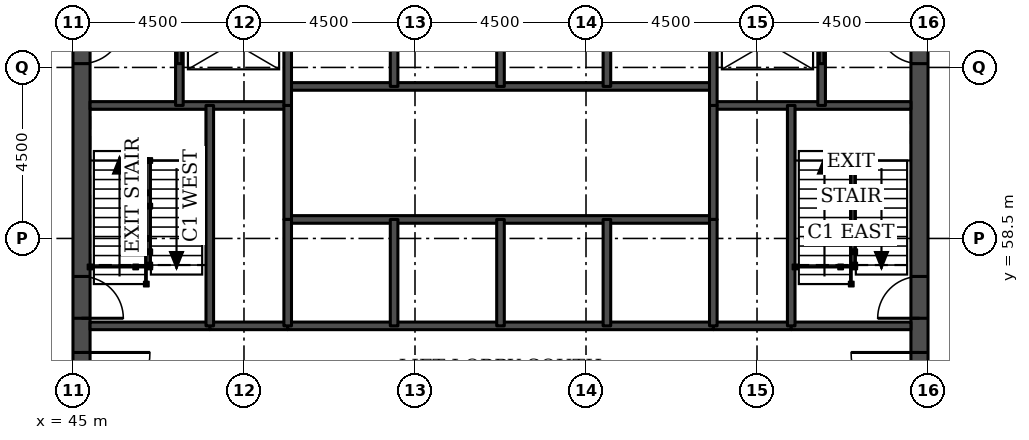
"""IFC4 building model, lengths in metres.
Left out: names, types, materials, properties, quantities, classifications, styles, units other than length and angle.
Written with IfcOpenShell. Run it as: python <this file> out.ifc"""

import sys

from ifc_helpers import new_model, si_unit, direction, frame, frame_2d, origin, place, context, subcontext, project, spatial, rectangle, extrude, element, fill, save


model = new_model("IFC4")
c1 = context("Model", 3, precision=1e-05, world=origin(), true_north=direction((0.0, 1.0)))
c2 = subcontext(c1, "Body", "Model", "MODEL_VIEW")
j1 = project(units=[si_unit("LENGTHUNIT", "METRE"), si_unit("PLANEANGLEUNIT", "RADIAN")], contexts=[c1])
p1 = place(None, origin())
s1 = spatial("IfcSite", under=j1, at=p1, CompositionType="ELEMENT")
p2 = place(p1, origin())
s2 = spatial("IfcBuilding", under=s1, at=p2, CompositionType="ELEMENT")
p3 = place(p2, frame((0.0, 0.0, 115.9)))
s3 = spatial("IfcBuildingStorey", under=s2, at=p3, CompositionType="ELEMENT", Elevation=115.9)
p4 = place(p3, frame((45.225, 49.5, 0.0), z_axis=(0.0, 0.0, 1.0), x_axis=(0.0, 1.0, 0.0)))
e1 = element("IfcWall", 1, at=p4, inside=s3, PredefinedType="SHEAR", context=c2, shape_type="SweptSolid", body=[
    extrude(rectangle(XDim=22.5, YDim=0.45, at=frame_2d((11.25, 0.0))), origin(), (0.0, 0.0, 1.0), 3.7),
])
p5 = place(p4, frame((4.2, 0.0, 0.0)))
e2 = element("IfcOpeningElement", 2, at=p5, cuts=e1, PredefinedType="OPENING", context=c2, shape_type="SweptSolid", body=[
    extrude(rectangle(XDim=1.8, YDim=2.1, at=frame_2d((0.9, 1.05))), frame((0.0, 0.235, 0.0), z_axis=(0.0, -1.0, 0.0), x_axis=(1.0, 0.0, 0.0)), (0.0, 0.0, 1.0), 0.47),
])
p6 = place(p4, frame((6.9, 0.0, 0.0)))
e3 = element("IfcOpeningElement", 3, at=p6, cuts=e1, PredefinedType="OPENING", context=c2, shape_type="SweptSolid", body=[
    extrude(rectangle(XDim=1.1, YDim=2.1, at=frame_2d((0.55, 1.05))), frame((0.0, 0.235, 0.0), z_axis=(0.0, -1.0, 0.0), x_axis=(1.0, 0.0, 0.0)), (0.0, 0.0, 1.0), 0.47),
])
p7 = place(p4, frame((13.6, 0.0, 0.0)))
e4 = element("IfcOpeningElement", 4, at=p7, cuts=e1, PredefinedType="OPENING", context=c2, shape_type="SweptSolid", body=[
    extrude(rectangle(XDim=1.1, YDim=2.1, at=frame_2d((0.55, 1.05))), frame((0.0, 0.235, 0.0), z_axis=(0.0, -1.0, 0.0), x_axis=(1.0, 0.0, 0.0)), (0.0, 0.0, 1.0), 0.47),
])
p8 = place(p4, frame((16.5, 0.0, 0.0)))
e5 = element("IfcOpeningElement", 5, at=p8, cuts=e1, PredefinedType="OPENING", context=c2, shape_type="SweptSolid", body=[
    extrude(rectangle(XDim=1.8, YDim=2.1, at=frame_2d((0.9, 1.05))), frame((0.0, 0.235, 0.0), z_axis=(0.0, -1.0, 0.0), x_axis=(1.0, 0.0, 0.0)), (0.0, 0.0, 1.0), 0.47),
])
p9 = place(p3, frame((67.275, 49.5, 0.0), z_axis=(0.0, 0.0, 1.0), x_axis=(0.0, 1.0, 0.0)))
e6 = element("IfcWall", 6, at=p9, inside=s3, PredefinedType="SHEAR", context=c2, shape_type="SweptSolid", body=[
    extrude(rectangle(XDim=22.5, YDim=0.45, at=frame_2d((11.25, 0.0))), origin(), (0.0, 0.0, 1.0), 3.7),
])
p10 = place(p9, frame((4.2, 0.0, 0.0)))
e7 = element("IfcOpeningElement", 7, at=p10, cuts=e6, PredefinedType="OPENING", context=c2, shape_type="SweptSolid", body=[
    extrude(rectangle(XDim=1.8, YDim=2.1, at=frame_2d((0.9, 1.05))), frame((0.0, 0.235, 0.0), z_axis=(0.0, -1.0, 0.0), x_axis=(1.0, 0.0, 0.0)), (0.0, 0.0, 1.0), 0.47),
])
p11 = place(p9, frame((6.9, 0.0, 0.0)))
e8 = element("IfcOpeningElement", 8, at=p11, cuts=e6, PredefinedType="OPENING", context=c2, shape_type="SweptSolid", body=[
    extrude(rectangle(XDim=1.1, YDim=2.1, at=frame_2d((0.55, 1.05))), frame((0.0, 0.235, 0.0), z_axis=(0.0, -1.0, 0.0), x_axis=(1.0, 0.0, 0.0)), (0.0, 0.0, 1.0), 0.47),
])
p12 = place(p9, frame((13.6, 0.0, 0.0)))
e9 = element("IfcOpeningElement", 9, at=p12, cuts=e6, PredefinedType="OPENING", context=c2, shape_type="SweptSolid", body=[
    extrude(rectangle(XDim=1.1, YDim=2.1, at=frame_2d((0.55, 1.05))), frame((0.0, 0.235, 0.0), z_axis=(0.0, -1.0, 0.0), x_axis=(1.0, 0.0, 0.0)), (0.0, 0.0, 1.0), 0.47),
])
p13 = place(p9, frame((16.5, 0.0, 0.0)))
e10 = element("IfcOpeningElement", 10, at=p13, cuts=e6, PredefinedType="OPENING", context=c2, shape_type="SweptSolid", body=[
    extrude(rectangle(XDim=1.8, YDim=2.1, at=frame_2d((0.9, 1.05))), frame((0.0, 0.235, 0.0), z_axis=(0.0, -1.0, 0.0), x_axis=(1.0, 0.0, 0.0)), (0.0, 0.0, 1.0), 0.47),
])
for number, where, z_axis, x_axis in (
    (11, (48.6, 56.2, 0.0), (0.0, 0.0, 1.0), (1.0, 0.0, 0.0)),
    (12, (61.85, 56.2, 0.0), (0.0, 0.0, 1.0), (1.0, 0.0, 0.0)),
):
    element("IfcWall", number, at=place(p3, frame(where, z_axis=z_axis, x_axis=x_axis)), inside=s3, PredefinedType="SOLIDWALL", context=c2, shape_type="SweptSolid", body=[
        extrude(rectangle(XDim=2.05, YDim=0.2, at=frame_2d((1.025, 0.0))), origin(), (0.0, 0.0, 1.0), 3.55),
    ])
p14 = place(p3, frame((45.45, 56.2, 0.0), z_axis=(0.0, 0.0, 1.0), x_axis=(1.0, 0.0, 0.0)))
e13 = element("IfcWall", 13, at=p14, inside=s3, PredefinedType="SOLIDWALL", context=c2, shape_type="SweptSolid", body=[
    extrude(rectangle(XDim=3.15, YDim=0.2, at=frame_2d((1.575, 0.0))), origin(), (0.0, 0.0, 1.0), 3.55),
])
p15 = place(p3, frame((50.65, 56.2, 0.0), z_axis=(0.0, 0.0, 1.0), x_axis=(1.0, 0.0, 0.0)))
e14 = element("IfcWall", 14, at=p15, inside=s3, PredefinedType="SOLIDWALL", context=c2, shape_type="SweptSolid", body=[
    extrude(rectangle(XDim=11.2, YDim=0.2, at=frame_2d((5.6, 0.0))), origin(), (0.0, 0.0, 1.0), 3.55),
])
p16 = place(p3, frame((63.9, 56.2, 0.0), z_axis=(0.0, 0.0, 1.0), x_axis=(1.0, 0.0, 0.0)))
e15 = element("IfcWall", 15, at=p16, inside=s3, PredefinedType="SOLIDWALL", context=c2, shape_type="SweptSolid", body=[
    extrude(rectangle(XDim=3.15, YDim=0.2, at=frame_2d((1.575, 0.0))), origin(), (0.0, 0.0, 1.0), 3.55),
])
p17 = place(p3, frame((50.65, 59.0, 0.0), z_axis=(0.0, 0.0, 1.0), x_axis=(1.0, 0.0, 0.0)))
e16 = element("IfcWall", 16, at=p17, inside=s3, PredefinedType="SOLIDWALL", context=c2, shape_type="SweptSolid", body=[
    extrude(rectangle(XDim=11.2, YDim=0.2, at=frame_2d((5.6, 0.0))), origin(), (0.0, 0.0, 1.0), 3.7),
])
for number, where, z_axis, x_axis in (
    (17, (45.45, 62.0, 0.0), (0.0, 0.0, 1.0), (1.0, 0.0, 0.0)),
    (18, (61.85, 62.0, 0.0), (0.0, 0.0, 1.0), (1.0, 0.0, 0.0)),
):
    element("IfcWall", number, at=place(p3, frame(where, z_axis=z_axis, x_axis=x_axis)), inside=s3, PredefinedType="SOLIDWALL", context=c2, shape_type="SweptSolid", body=[
        extrude(rectangle(XDim=5.2, YDim=0.2, at=frame_2d((2.6, 0.0))), origin(), (0.0, 0.0, 1.0), 3.55),
    ])
p18 = place(p3, frame((50.65, 62.5, 0.0), z_axis=(0.0, 0.0, 1.0), x_axis=(1.0, 0.0, 0.0)))
e19 = element("IfcWall", 19, at=p18, inside=s3, PredefinedType="SOLIDWALL", context=c2, shape_type="SweptSolid", body=[
    extrude(rectangle(XDim=11.2, YDim=0.2, at=frame_2d((5.6, 0.0))), origin(), (0.0, 0.0, 1.0), 3.7),
])
p19 = place(p3, frame((47.8, 62.0, 0.0), z_axis=(0.0, 0.0, 1.0), x_axis=(0.0, 1.0, 0.0)))
e20 = element("IfcWall", 20, at=p19, inside=s3, PredefinedType="SOLIDWALL", context=c2, shape_type="SweptSolid", body=[
    extrude(rectangle(XDim=3.3, YDim=0.2, at=frame_2d((1.65, 0.0))), origin(), (0.0, 0.0, 1.0), 3.55),
])
p20 = place(p19, frame((1.1, 0.0, 0.0)))
e21 = element("IfcOpeningElement", 21, at=p20, cuts=e20, PredefinedType="OPENING", context=c2, shape_type="SweptSolid", body=[
    extrude(rectangle(XDim=1.1, YDim=2.1, at=frame_2d((0.55, 1.05))), frame((0.0, 0.11, 0.0), z_axis=(0.0, -1.0, 0.0), x_axis=(1.0, 0.0, 0.0)), (0.0, 0.0, 1.0), 0.22),
])
p21 = place(p3, frame((48.6, 56.2, 0.0), z_axis=(0.0, 0.0, 1.0), x_axis=(0.0, 1.0, 0.0)))
e22 = element("IfcWall", 22, at=p21, inside=s3, PredefinedType="SOLIDWALL", context=c2, shape_type="SweptSolid", body=[
    extrude(rectangle(XDim=5.8, YDim=0.2, at=frame_2d((2.9, 0.0))), origin(), (0.0, 0.0, 1.0), 3.55),
])
p22 = place(p3, frame((50.65, 59.0, 0.0), z_axis=(0.0, 0.0, 1.0), x_axis=(0.0, 1.0, 0.0)))
e23 = element("IfcWall", 23, at=p22, inside=s3, PredefinedType="SOLIDWALL", context=c2, shape_type="SweptSolid", body=[
    extrude(rectangle(XDim=3.0, YDim=0.2, at=frame_2d((1.5, 0.0))), origin(), (0.0, 0.0, 1.0), 3.7),
])
p23 = place(p3, frame((50.65, 56.2, 0.0), z_axis=(0.0, 0.0, 1.0), x_axis=(0.0, 1.0, 0.0)))
e24 = element("IfcWall", 24, at=p23, inside=s3, PredefinedType="SOLIDWALL", context=c2, shape_type="SweptSolid", body=[
    extrude(rectangle(XDim=2.8, YDim=0.2, at=frame_2d((1.4, 0.0))), origin(), (0.0, 0.0, 1.0), 3.55),
])
p24 = place(p3, frame((50.65, 62.0, 0.0), z_axis=(0.0, 0.0, 1.0), x_axis=(0.0, 1.0, 0.0)))
e25 = element("IfcWall", 25, at=p24, inside=s3, PredefinedType="SOLIDWALL", context=c2, shape_type="SweptSolid", body=[
    extrude(rectangle(XDim=3.3, YDim=0.2, at=frame_2d((1.65, 0.0))), origin(), (0.0, 0.0, 1.0), 3.55),
])
for number, where, z_axis, x_axis in (
    (26, (53.45, 56.2, 0.0), (0.0, 0.0, 1.0), (0.0, 1.0, 0.0)),
    (27, (53.45, 62.5, 0.0), (0.0, 0.0, 1.0), (0.0, 1.0, 0.0)),
    (28, (56.25, 56.2, 0.0), (0.0, 0.0, 1.0), (0.0, 1.0, 0.0)),
    (29, (56.25, 62.5, 0.0), (0.0, 0.0, 1.0), (0.0, 1.0, 0.0)),
    (30, (59.05, 56.2, 0.0), (0.0, 0.0, 1.0), (0.0, 1.0, 0.0)),
    (31, (59.05, 62.5, 0.0), (0.0, 0.0, 1.0), (0.0, 1.0, 0.0)),
):
    element("IfcWall", number, at=place(p3, frame(where, z_axis=z_axis, x_axis=x_axis)), inside=s3, PredefinedType="SOLIDWALL", context=c2, shape_type="SweptSolid", body=[
        extrude(rectangle(XDim=2.8, YDim=0.2, at=frame_2d((1.4, 0.0))), origin(), (0.0, 0.0, 1.0), 3.55),
    ])
p25 = place(p3, frame((61.85, 59.0, 0.0), z_axis=(0.0, 0.0, 1.0), x_axis=(0.0, 1.0, 0.0)))
e32 = element("IfcWall", 32, at=p25, inside=s3, PredefinedType="SOLIDWALL", context=c2, shape_type="SweptSolid", body=[
    extrude(rectangle(XDim=3.0, YDim=0.2, at=frame_2d((1.5, 0.0))), origin(), (0.0, 0.0, 1.0), 3.7),
])
p26 = place(p3, frame((61.85, 56.2, 0.0), z_axis=(0.0, 0.0, 1.0), x_axis=(0.0, 1.0, 0.0)))
e33 = element("IfcWall", 33, at=p26, inside=s3, PredefinedType="SOLIDWALL", context=c2, shape_type="SweptSolid", body=[
    extrude(rectangle(XDim=2.8, YDim=0.2, at=frame_2d((1.4, 0.0))), origin(), (0.0, 0.0, 1.0), 3.55),
])
p27 = place(p3, frame((61.85, 62.0, 0.0), z_axis=(0.0, 0.0, 1.0), x_axis=(0.0, 1.0, 0.0)))
e34 = element("IfcWall", 34, at=p27, inside=s3, PredefinedType="SOLIDWALL", context=c2, shape_type="SweptSolid", body=[
    extrude(rectangle(XDim=3.3, YDim=0.2, at=frame_2d((1.65, 0.0))), origin(), (0.0, 0.0, 1.0), 3.55),
])
p28 = place(p3, frame((63.9, 56.2, 0.0), z_axis=(0.0, 0.0, 1.0), x_axis=(0.0, 1.0, 0.0)))
e35 = element("IfcWall", 35, at=p28, inside=s3, PredefinedType="SOLIDWALL", context=c2, shape_type="SweptSolid", body=[
    extrude(rectangle(XDim=5.8, YDim=0.2, at=frame_2d((2.9, 0.0))), origin(), (0.0, 0.0, 1.0), 3.55),
])
p29 = place(p3, frame((64.7, 62.0, 0.0), z_axis=(0.0, 0.0, 1.0), x_axis=(0.0, 1.0, 0.0)))
e36 = element("IfcWall", 36, at=p29, inside=s3, PredefinedType="SOLIDWALL", context=c2, shape_type="SweptSolid", body=[
    extrude(rectangle(XDim=3.3, YDim=0.2, at=frame_2d((1.65, 0.0))), origin(), (0.0, 0.0, 1.0), 3.55),
])
p30 = place(p29, frame((1.1, 0.0, 0.0)))
e37 = element("IfcOpeningElement", 37, at=p30, cuts=e36, PredefinedType="OPENING", context=c2, shape_type="SweptSolid", body=[
    extrude(rectangle(XDim=1.1, YDim=2.1, at=frame_2d((0.55, 1.05))), frame((0.0, 0.11, 0.0), z_axis=(0.0, -1.0, 0.0), x_axis=(1.0, 0.0, 0.0)), (0.0, 0.0, 1.0), 0.22),
])
p31 = place(p20, origin())
e38 = element("IfcDoor", 38, at=p31, inside=s3, OperationType="DOUBLE_DOOR_SLIDING", PredefinedType="DOOR", context=c2, shape_type="SweptSolid", body=[
    extrude(rectangle(XDim=1.1, YDim=2.1, at=frame_2d((0.55, 1.05))), frame((0.0, 0.025, 0.0), z_axis=(0.0, -1.0, 0.0), x_axis=(1.0, 0.0, 0.0)), (0.0, 0.0, 1.0), 0.05),
])
fill(e21, e38)
p32 = place(p30, origin())
e39 = element("IfcDoor", 39, at=p32, inside=s3, OperationType="DOUBLE_DOOR_SLIDING", PredefinedType="DOOR", context=c2, shape_type="SweptSolid", body=[
    extrude(rectangle(XDim=1.1, YDim=2.1, at=frame_2d((0.55, 1.05))), frame((0.0, 0.025, 0.0), z_axis=(0.0, -1.0, 0.0), x_axis=(1.0, 0.0, 0.0)), (0.0, 0.0, 1.0), 0.05),
])
fill(e37, e39)
p33 = place(p5, frame((1.8, 0.0, 0.0), z_axis=(0.0, 0.0, 1.0), x_axis=(-1.0, 0.0, 0.0)))
e40 = element("IfcDoor", 40, at=p33, inside=s3, OperationType="SINGLE_SWING_LEFT", PredefinedType="DOOR", context=c2, shape_type="SweptSolid", body=[
    extrude(rectangle(XDim=1.8, YDim=2.1, at=frame_2d((0.9, 1.05))), frame((0.0, 0.025, 0.0), z_axis=(0.0, -1.0, 0.0), x_axis=(1.0, 0.0, 0.0)), (0.0, 0.0, 1.0), 0.05),
])
fill(e2, e40)
p34 = place(p6, frame((1.1, 0.0, 0.0), z_axis=(0.0, 0.0, 1.0), x_axis=(-1.0, 0.0, 0.0)))
e41 = element("IfcDoor", 41, at=p34, inside=s3, OperationType="SINGLE_SWING_RIGHT", PredefinedType="DOOR", context=c2, shape_type="SweptSolid", body=[
    extrude(rectangle(XDim=1.1, YDim=2.1, at=frame_2d((0.55, 1.05))), frame((0.0, 0.025, 0.0), z_axis=(0.0, -1.0, 0.0), x_axis=(1.0, 0.0, 0.0)), (0.0, 0.0, 1.0), 0.05),
])
fill(e3, e41)
p35 = place(p7, frame((1.1, 0.0, 0.0), z_axis=(0.0, 0.0, 1.0), x_axis=(-1.0, 0.0, 0.0)))
e42 = element("IfcDoor", 42, at=p35, inside=s3, OperationType="SINGLE_SWING_LEFT", PredefinedType="DOOR", context=c2, shape_type="SweptSolid", body=[
    extrude(rectangle(XDim=1.1, YDim=2.1, at=frame_2d((0.55, 1.05))), frame((0.0, 0.025, 0.0), z_axis=(0.0, -1.0, 0.0), x_axis=(1.0, 0.0, 0.0)), (0.0, 0.0, 1.0), 0.05),
])
fill(e4, e42)
p36 = place(p10, origin())
e43 = element("IfcDoor", 43, at=p36, inside=s3, OperationType="SINGLE_SWING_RIGHT", PredefinedType="DOOR", context=c2, shape_type="SweptSolid", body=[
    extrude(rectangle(XDim=1.8, YDim=2.1, at=frame_2d((0.9, 1.05))), frame((0.0, 0.025, 0.0), z_axis=(0.0, -1.0, 0.0), x_axis=(1.0, 0.0, 0.0)), (0.0, 0.0, 1.0), 0.05),
])
fill(e7, e43)
p37 = place(p11, origin())
e44 = element("IfcDoor", 44, at=p37, inside=s3, OperationType="SINGLE_SWING_LEFT", PredefinedType="DOOR", context=c2, shape_type="SweptSolid", body=[
    extrude(rectangle(XDim=1.1, YDim=2.1, at=frame_2d((0.55, 1.05))), frame((0.0, 0.025, 0.0), z_axis=(0.0, -1.0, 0.0), x_axis=(1.0, 0.0, 0.0)), (0.0, 0.0, 1.0), 0.05),
])
fill(e8, e44)
p38 = place(p12, origin())
e45 = element("IfcDoor", 45, at=p38, inside=s3, OperationType="SINGLE_SWING_RIGHT", PredefinedType="DOOR", context=c2, shape_type="SweptSolid", body=[
    extrude(rectangle(XDim=1.1, YDim=2.1, at=frame_2d((0.55, 1.05))), frame((0.0, 0.025, 0.0), z_axis=(0.0, -1.0, 0.0), x_axis=(1.0, 0.0, 0.0)), (0.0, 0.0, 1.0), 0.05),
])
fill(e9, e45)
save(model, sys.argv[1])
